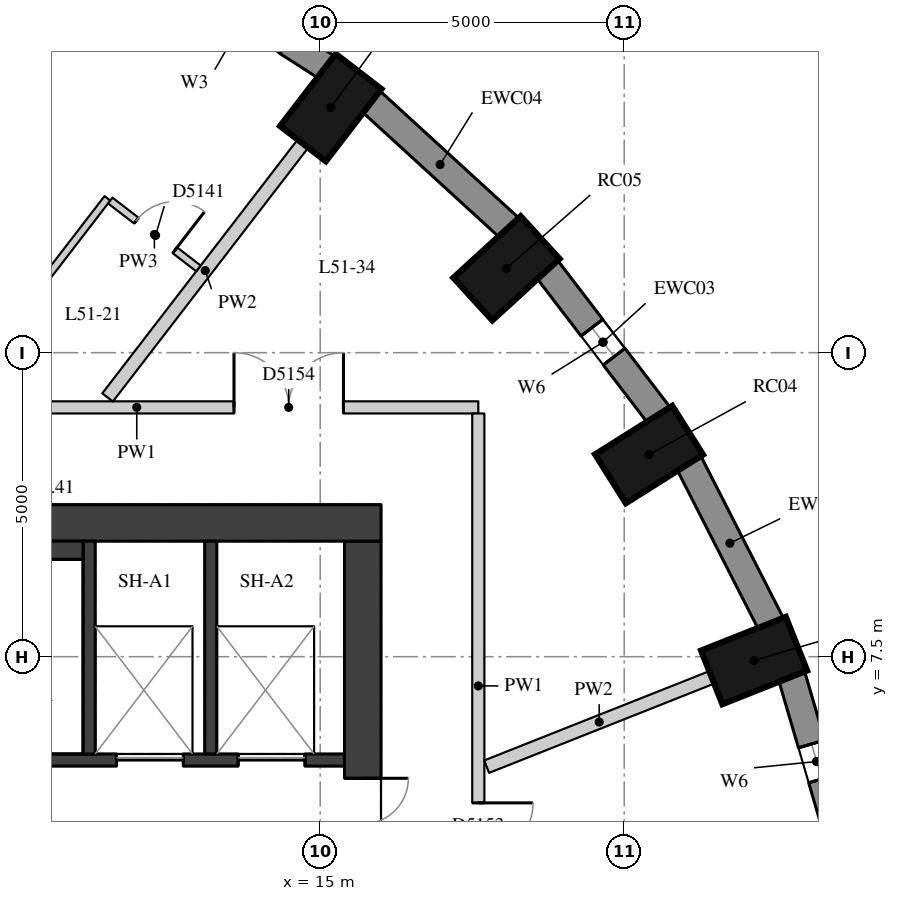
"""IFC4 building model, lengths in metres.
Left out: names, types, materials, properties, quantities, classifications, styles, units other than length and angle.
Written with IfcOpenShell. Run it as: python <this file> out.ifc"""

import sys

from ifc_helpers import new_model, si_unit, direction, frame, frame_2d, origin, origin_2d, place, context, subcontext, project, spatial, rectangle, extrude, element, fill, save


model = new_model("IFC4")
c1 = context("Model", 3, precision=1e-05, world=origin(), true_north=direction((0.0, 1.0)))
c2 = subcontext(c1, "Body", "Model", "MODEL_VIEW")
j1 = project(units=[si_unit("LENGTHUNIT", "METRE"), si_unit("PLANEANGLEUNIT", "RADIAN")], contexts=[c1])
p1 = place(None, origin())
s1 = spatial("IfcSite", under=j1, at=p1, CompositionType="ELEMENT")
p2 = place(p1, origin())
s2 = spatial("IfcBuilding", under=s1, at=p2, CompositionType="ELEMENT")
p3 = place(p2, frame((0.0, 0.0, 181.4)))
s3 = spatial("IfcBuildingStorey", under=s2, at=p3, CompositionType="ELEMENT", Elevation=181.4)
for number, where, z_axis, x_axis in (
    (1, (22.136, 7.436, 0.0), (0.0, 0.0, 1.0), (0.93, 0.369, 0.0)),
    (2, (20.408, 10.825, 0.0), (0.0, 0.0, 1.0), (0.846, 0.533, 0.0)),
    (3, (18.064, 13.888, 0.0), (0.0, 0.0, 1.0), (0.738, 0.675, 0.0)),
    (4, (15.173, 16.532, 0.0), (0.0, 0.0, 1.0), (0.61, 0.792, 0.0)),
):
    element("IfcColumn", number, at=place(p3, frame(where, z_axis=z_axis, x_axis=x_axis)), inside=s3, PredefinedType="COLUMN", context=c2, shape_type="SweptSolid", body=[
        extrude(rectangle(XDim=1.5, YDim=0.95, at=origin_2d()), origin(), (0.0, 0.0, 1.0), 3.3),
    ])
p4 = place(p3, frame((23.58, 4.362, 0.0), z_axis=(0.0, 0.0, 1.0), x_axis=(-0.281049481624, 0.959693278542, 0.0)))
e5 = element("IfcWall", 5, at=p4, inside=s3, PredefinedType="SOLIDWALL", context=c2, shape_type="SweptSolid", body=[
    extrude(rectangle(XDim=2.948, YDim=0.45, at=frame_2d((1.474, 0.0))), origin(), (0.0, 0.0, 1.0), 2.85),
])
p5 = place(p4, frame((1.174, 0.0, 0.4)))
e6 = element("IfcOpeningElement", 6, at=p5, cuts=e5, PredefinedType="OPENING", context=c2, shape_type="SweptSolid", body=[
    extrude(rectangle(XDim=0.6, YDim=1.75, at=frame_2d((0.3, 0.875))), frame((0.0, 0.235, 0.0), z_axis=(0.0, -1.0, 0.0), x_axis=(1.0, 0.0, 0.0)), (0.0, 0.0, 1.0), 0.47),
])
p6 = place(p3, frame((22.415, 8.037, 0.0), z_axis=(0.0, 0.0, 1.0), x_axis=(-0.454133999889, 0.890933392653, 0.0)))
e7 = element("IfcWall", 7, at=p6, inside=s3, PredefinedType="SOLIDWALL", context=c2, shape_type="SweptSolid", body=[
    extrude(rectangle(XDim=2.986, YDim=0.45, at=frame_2d((1.493, 0.0))), origin(), (0.0, 0.0, 1.0), 2.85),
])
p7 = place(p3, frame((20.574, 11.467, 0.0), z_axis=(0.0, 0.0, 1.0), x_axis=(-0.607817056371, 0.794077090706, 0.0)))
e8 = element("IfcWall", 8, at=p7, inside=s3, PredefinedType="SOLIDWALL", context=c2, shape_type="SweptSolid", body=[
    extrude(rectangle(XDim=3.037, YDim=0.45, at=frame_2d((1.519, 0.0))), origin(), (0.0, 0.0, 1.0), 2.85),
])
p8 = place(p7, frame((1.219, 0.0, 0.4)))
e9 = element("IfcOpeningElement", 9, at=p8, cuts=e8, PredefinedType="OPENING", context=c2, shape_type="SweptSolid", body=[
    extrude(rectangle(XDim=0.6, YDim=1.75, at=frame_2d((0.3, 0.875))), frame((0.0, 0.235, 0.0), z_axis=(0.0, -1.0, 0.0), x_axis=(1.0, 0.0, 0.0)), (0.0, 0.0, 1.0), 0.47),
])
p9 = place(p3, frame((18.113, 14.55, 0.0), z_axis=(0.0, 0.0, 1.0), x_axis=(-0.737808755941, 0.675009807082, 0.0)))
e10 = element("IfcWall", 10, at=p9, inside=s3, PredefinedType="SOLIDWALL", context=c2, shape_type="SweptSolid", body=[
    extrude(rectangle(XDim=3.094, YDim=0.45, at=frame_2d((1.547, 0.0))), origin(), (0.0, 0.0, 1.0), 2.85),
])
p10 = place(p3, frame((15.108, 17.193, 0.0), z_axis=(0.0, 0.0, 1.0), x_axis=(-0.842030726237, 0.539429565442, 0.0)))
e11 = element("IfcWall", 11, at=p10, inside=s3, PredefinedType="SOLIDWALL", context=c2, shape_type="SweptSolid", body=[
    extrude(rectangle(XDim=3.151, YDim=0.45, at=frame_2d((1.576, 0.0))), origin(), (0.0, 0.0, 1.0), 2.85),
])
p11 = place(p10, frame((0.776, 0.0, 0.4)))
e12 = element("IfcOpeningElement", 12, at=p11, cuts=e11, PredefinedType="OPENING", context=c2, shape_type="SweptSolid", body=[
    extrude(rectangle(XDim=1.6, YDim=1.75, at=frame_2d((0.8, 0.875))), frame((0.0, 0.235, 0.0), z_axis=(0.0, -1.0, 0.0), x_axis=(1.0, 0.0, 0.0)), (0.0, 0.0, 1.0), 0.47),
])
p12 = place(p3, frame((15.7, -9.4, 0.0), z_axis=(0.0, 0.0, 1.0), x_axis=(0.0, 1.0, 0.0)))
e13 = element("IfcWall", 13, at=p12, inside=s3, PredefinedType="SHEAR", context=c2, shape_type="SweptSolid", body=[
    extrude(rectangle(XDim=18.8, YDim=0.6, at=frame_2d((9.4, 0.0))), origin(), (0.0, 0.0, 1.0), 2.85),
])
p13 = place(p12, frame((13.4, 0.0, 0.0)))
e14 = element("IfcOpeningElement", 14, at=p13, cuts=e13, PredefinedType="OPENING", context=c2, shape_type="SweptSolid", body=[
    extrude(rectangle(XDim=1.5, YDim=2.1, at=frame_2d((0.75, 1.05))), frame((0.0, 0.31, 0.0), z_axis=(0.0, -1.0, 0.0), x_axis=(1.0, 0.0, 0.0)), (0.0, 0.0, 1.0), 0.62),
])
p14 = place(p12, frame((3.9, 0.0, 0.0)))
e15 = element("IfcOpeningElement", 15, at=p14, cuts=e13, PredefinedType="OPENING", context=c2, shape_type="SweptSolid", body=[
    extrude(rectangle(XDim=1.5, YDim=2.1, at=frame_2d((0.75, 1.05))), frame((0.0, 0.31, 0.0), z_axis=(0.0, -1.0, 0.0), x_axis=(1.0, 0.0, 0.0)), (0.0, 0.0, 1.0), 0.62),
])
p15 = place(p3, frame((4.0, 9.7, 0.0), z_axis=(0.0, 0.0, 1.0), x_axis=(1.0, 0.0, 0.0)))
e16 = element("IfcWall", 16, at=p15, inside=s3, PredefinedType="SHEAR", context=c2, shape_type="SweptSolid", body=[
    extrude(rectangle(XDim=12.0, YDim=0.6, at=frame_2d((6.0, 0.0))), origin(), (0.0, 0.0, 1.0), 2.85),
])
p16 = place(p3, frame((4.6, 5.8, 0.0), z_axis=(0.0, 0.0, 1.0), x_axis=(1.0, 0.0, 0.0)))
e17 = element("IfcWall", 17, at=p16, inside=s3, PredefinedType="SHEAR", context=c2, shape_type="SweptSolid", body=[
    extrude(rectangle(XDim=10.8, YDim=0.2, at=frame_2d((5.4, 0.0))), origin(), (0.0, 0.0, 1.0), 2.85),
])
p17 = place(p16, frame((7.05, 0.0, 0.0)))
e18 = element("IfcOpeningElement", 18, at=p17, cuts=e17, PredefinedType="OPENING", context=c2, shape_type="SweptSolid", body=[
    extrude(rectangle(XDim=1.1, YDim=2.1, at=frame_2d((0.55, 1.05))), frame((0.0, 0.11, 0.0), z_axis=(0.0, -1.0, 0.0), x_axis=(1.0, 0.0, 0.0)), (0.0, 0.0, 1.0), 0.22),
])
p18 = place(p16, frame((9.05, 0.0, 0.0)))
e19 = element("IfcOpeningElement", 19, at=p18, cuts=e17, PredefinedType="OPENING", context=c2, shape_type="SweptSolid", body=[
    extrude(rectangle(XDim=1.1, YDim=2.1, at=frame_2d((0.55, 1.05))), frame((0.0, 0.11, 0.0), z_axis=(0.0, -1.0, 0.0), x_axis=(1.0, 0.0, 0.0)), (0.0, 0.0, 1.0), 0.22),
])
for number, where, z_axis, x_axis in (
    (20, (11.2, 5.9, 0.0), (0.0, 0.0, 1.0), (0.0, 1.0, 0.0)),
    (21, (13.2, 5.9, 0.0), (0.0, 0.0, 1.0), (0.0, 1.0, 0.0)),
):
    element("IfcWall", number, at=place(p3, frame(where, z_axis=z_axis, x_axis=x_axis)), inside=s3, PredefinedType="SHEAR", context=c2, shape_type="SweptSolid", body=[
        extrude(rectangle(XDim=3.5, YDim=0.2, at=frame_2d((1.75, 0.0))), origin(), (0.0, 0.0, 1.0), 2.85),
    ])
p19 = place(p3, frame((6.22, 9.25, 0.0), z_axis=(0.0, 0.0, 1.0), x_axis=(1.0, 0.0, 0.0)))
e22 = element("IfcWall", 22, at=p19, inside=s3, PredefinedType="PARTITIONING", context=c2, shape_type="SweptSolid", body=[
    extrude(rectangle(XDim=4.88, YDim=0.3, at=frame_2d((2.44, 0.0))), origin(), (0.0, 0.0, 1.0), 2.85),
])
p20 = place(p3, frame((6.366, 11.6, 0.0), z_axis=(0.0, 0.0, 1.0), x_axis=(1.0, 0.0, 0.0)))
e23 = element("IfcWall", 23, at=p20, inside=s3, PredefinedType="PARTITIONING", context=c2, shape_type="SweptSolid", body=[
    extrude(rectangle(XDim=11.234, YDim=0.2, at=frame_2d((5.617, 0.0))), origin(), (0.0, 0.0, 1.0), 2.85),
])
p21 = place(p20, frame((1.086, 0.0, 0.0)))
e24 = element("IfcOpeningElement", 24, at=p21, cuts=e23, PredefinedType="OPENING", context=c2, shape_type="SweptSolid", body=[
    extrude(rectangle(XDim=1.1, YDim=2.1, at=frame_2d((0.55, 1.05))), frame((0.0, 0.11, 0.0), z_axis=(0.0, -1.0, 0.0), x_axis=(1.0, 0.0, 0.0)), (0.0, 0.0, 1.0), 0.22),
])
p22 = place(p20, frame((7.216, 0.0, 0.0)))
e25 = element("IfcOpeningElement", 25, at=p22, cuts=e23, PredefinedType="OPENING", context=c2, shape_type="SweptSolid", body=[
    extrude(rectangle(XDim=1.8, YDim=2.1, at=frame_2d((0.9, 1.05))), frame((0.0, 0.11, 0.0), z_axis=(0.0, -1.0, 0.0), x_axis=(1.0, 0.0, 0.0)), (0.0, 0.0, 1.0), 0.22),
])
p23 = place(p3, frame((17.6, 11.5, 0.0), z_axis=(0.0, 0.0, 1.0), x_axis=(0.0, -1.0, 0.0)))
e26 = element("IfcWall", 26, at=p23, inside=s3, PredefinedType="PARTITIONING", context=c2, shape_type="SweptSolid", body=[
    extrude(rectangle(XDim=8.962, YDim=0.2, at=frame_2d((4.481, 0.0))), origin(), (0.0, 0.0, 1.0), 2.85),
])
p24 = place(p23, frame((6.404, 0.0, 0.0)))
e27 = element("IfcOpeningElement", 27, at=p24, cuts=e26, PredefinedType="OPENING", context=c2, shape_type="SweptSolid", body=[
    extrude(rectangle(XDim=1.8, YDim=2.1, at=frame_2d((0.9, 1.05))), frame((0.0, 0.11, 0.0), z_axis=(0.0, -1.0, 0.0), x_axis=(1.0, 0.0, 0.0)), (0.0, 0.0, 1.0), 0.22),
])
p25 = place(p3, frame((21.439, 7.16, 0.0), z_axis=(0.0, 0.0, 1.0), x_axis=(-0.929517399972, -0.368778257426, 0.0)))
e28 = element("IfcWall", 28, at=p25, inside=s3, PredefinedType="PARTITIONING", context=c2, shape_type="SweptSolid", body=[
    extrude(rectangle(XDim=3.982, YDim=0.22, at=frame_2d((1.991, 0.0))), origin(), (0.0, 0.0, 1.0), 2.85),
])
p26 = place(p3, frame((14.716, 15.937, 0.0), z_axis=(0.0, 0.0, 1.0), x_axis=(-0.61000193202, -0.792399926131, 0.0)))
e29 = element("IfcWall", 29, at=p26, inside=s3, PredefinedType="PARTITIONING", context=c2, shape_type="SweptSolid", body=[
    extrude(rectangle(XDim=5.267, YDim=0.22, at=frame_2d((2.634, 0.0))), origin(), (0.0, 0.0, 1.0), 2.85),
])
p27 = place(p3, frame((8.955, 11.732, 0.0), z_axis=(0.0, 0.0, 1.0), x_axis=(0.609996270026, 0.79240428479, 0.0)))
e30 = element("IfcWall", 30, at=p27, inside=s3, PredefinedType="PARTITIONING", context=c2, shape_type="SweptSolid", body=[
    extrude(rectangle(XDim=4.173, YDim=0.12, at=frame_2d((2.087, 0.0))), origin(), (0.0, 0.0, 1.0), 2.85),
])
p28 = place(p3, frame((11.548, 15.002, 0.0), z_axis=(0.0, 0.0, 1.0), x_axis=(0.792445416108, -0.609942835428, 0.0)))
e31 = element("IfcWall", 31, at=p28, inside=s3, PredefinedType="PARTITIONING", context=c2, shape_type="SweptSolid", body=[
    extrude(rectangle(XDim=1.83, YDim=0.12, at=frame_2d((0.915, 0.0))), origin(), (0.0, 0.0, 1.0), 2.85),
])
p29 = place(p28, frame((0.54, 0.0, 0.0)))
e32 = element("IfcOpeningElement", 32, at=p29, cuts=e31, PredefinedType="OPENING", context=c2, shape_type="SweptSolid", body=[
    extrude(rectangle(XDim=0.8, YDim=2.1, at=frame_2d((0.4, 1.05))), frame((0.0, 0.07, 0.0), z_axis=(0.0, -1.0, 0.0), x_axis=(1.0, 0.0, 0.0)), (0.0, 0.0, 1.0), 0.14),
])
p30 = place(p5, origin())
e33 = element("IfcWindow", 33, at=p30, inside=s3, PartitioningType="SINGLE_PANEL", PredefinedType="WINDOW", context=c2, shape_type="SweptSolid", body=[
    extrude(rectangle(XDim=0.6, YDim=1.75, at=frame_2d((0.3, 0.875))), frame((0.0, 0.035, 0.0), z_axis=(0.0, -1.0, 0.0), x_axis=(1.0, 0.0, 0.0)), (0.0, 0.0, 1.0), 0.06),
])
fill(e6, e33)
p31 = place(p8, origin())
e34 = element("IfcWindow", 34, at=p31, inside=s3, PartitioningType="SINGLE_PANEL", PredefinedType="WINDOW", context=c2, shape_type="SweptSolid", body=[
    extrude(rectangle(XDim=0.6, YDim=1.75, at=frame_2d((0.3, 0.875))), frame((0.0, 0.035, 0.0), z_axis=(0.0, -1.0, 0.0), x_axis=(1.0, 0.0, 0.0)), (0.0, 0.0, 1.0), 0.06),
])
fill(e9, e34)
p32 = place(p13, origin())
e35 = element("IfcDoor", 35, at=p32, inside=s3, OperationType="DOUBLE_DOOR_SINGLE_SWING", PredefinedType="DOOR", context=c2, shape_type="SweptSolid", body=[
    extrude(rectangle(XDim=1.5, YDim=2.1, at=frame_2d((0.75, 1.05))), frame((0.0, 0.025, 0.0), z_axis=(0.0, -1.0, 0.0), x_axis=(1.0, 0.0, 0.0)), (0.0, 0.0, 1.0), 0.05),
])
fill(e14, e35)
p33 = place(p17, origin())
e36 = element("IfcDoor", 36, at=p33, inside=s3, OperationType="DOUBLE_DOOR_SLIDING", PredefinedType="DOOR", context=c2, shape_type="SweptSolid", body=[
    extrude(rectangle(XDim=1.1, YDim=2.1, at=frame_2d((0.55, 1.05))), frame((0.0, 0.025, 0.0), z_axis=(0.0, -1.0, 0.0), x_axis=(1.0, 0.0, 0.0)), (0.0, 0.0, 1.0), 0.05),
])
fill(e18, e36)
p34 = place(p18, origin())
e37 = element("IfcDoor", 37, at=p34, inside=s3, OperationType="DOUBLE_DOOR_SLIDING", PredefinedType="DOOR", context=c2, shape_type="SweptSolid", body=[
    extrude(rectangle(XDim=1.1, YDim=2.1, at=frame_2d((0.55, 1.05))), frame((0.0, 0.025, 0.0), z_axis=(0.0, -1.0, 0.0), x_axis=(1.0, 0.0, 0.0)), (0.0, 0.0, 1.0), 0.05),
])
fill(e19, e37)
p35 = place(p29, origin())
e38 = element("IfcDoor", 38, at=p35, inside=s3, OperationType="SINGLE_SWING_RIGHT", PredefinedType="DOOR", context=c2, shape_type="SweptSolid", body=[
    extrude(rectangle(XDim=0.8, YDim=2.1, at=frame_2d((0.4, 1.05))), frame((0.0, 0.025, 0.0), z_axis=(0.0, -1.0, 0.0), x_axis=(1.0, 0.0, 0.0)), (0.0, 0.0, 1.0), 0.05),
])
fill(e32, e38)
p36 = place(p24, origin())
e39 = element("IfcDoor", 39, at=p36, inside=s3, OperationType="DOUBLE_DOOR_SINGLE_SWING", PredefinedType="DOOR", context=c2, shape_type="SweptSolid", body=[
    extrude(rectangle(XDim=1.8, YDim=2.1, at=frame_2d((0.9, 1.05))), frame((0.0, 0.025, 0.0), z_axis=(0.0, -1.0, 0.0), x_axis=(1.0, 0.0, 0.0)), (0.0, 0.0, 1.0), 0.05),
])
fill(e27, e39)
p37 = place(p22, origin())
e40 = element("IfcDoor", 40, at=p37, inside=s3, OperationType="DOUBLE_DOOR_SINGLE_SWING", PredefinedType="DOOR", context=c2, shape_type="SweptSolid", body=[
    extrude(rectangle(XDim=1.8, YDim=2.1, at=frame_2d((0.9, 1.05))), frame((0.0, 0.025, 0.0), z_axis=(0.0, -1.0, 0.0), x_axis=(1.0, 0.0, 0.0)), (0.0, 0.0, 1.0), 0.05),
])
fill(e25, e40)
save(model, sys.argv[1])
